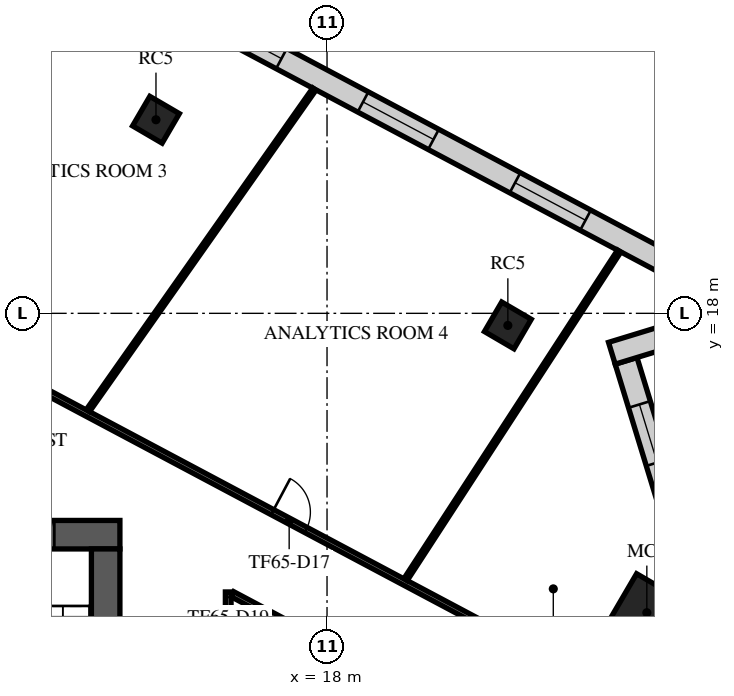
"""IFC4 building model, lengths in metres.
Left out: names, types, materials, properties, quantities, classifications, styles, units other than length and angle.
Written with IfcOpenShell. Run it as: python <this file> out.ifc"""

import sys

from ifc_helpers import new_model, si_unit, direction, frame, frame_2d, origin, origin_2d, place, context, subcontext, project, spatial, rectangle, extrude, element, fill, save


model = new_model("IFC4")
c1 = context("Model", 3, precision=1e-05, world=origin(), true_north=direction((0.0, 1.0)))
c2 = subcontext(c1, "Body", "Model", "MODEL_VIEW")
j1 = project(units=[si_unit("LENGTHUNIT", "METRE"), si_unit("PLANEANGLEUNIT", "RADIAN")], contexts=[c1])
p1 = place(None, origin())
s1 = spatial("IfcSite", under=j1, at=p1, CompositionType="ELEMENT")
p2 = place(p1, origin())
s2 = spatial("IfcBuilding", under=s1, at=p2, CompositionType="ELEMENT")
p3 = place(p2, frame((0.0, 0.0, 274.9)))
s3 = spatial("IfcBuildingStorey", under=s2, at=p3, CompositionType="ELEMENT", Elevation=274.9)
p4 = place(p3, frame((26.415, 10.122, 0.0), z_axis=(0.0, 0.0, 1.0), x_axis=(0.504643651291, 0.863327739165, 0.0)))
e1 = element("IfcColumn", 1, at=p4, inside=s3, PredefinedType="COLUMN", context=c2, shape_type="SweptSolid", body=[
    extrude(rectangle(XDim=1.5, YDim=1.5, at=origin_2d()), origin(), (0.0, 0.0, 1.0), 4.0),
])
for number, where, z_axis, x_axis in (
    (2, (22.758, 17.682, 0.0), (0.0, 0.0, 1.0), (0.505, 0.863, 0.0)),
    (3, (13.499, 23.094, 0.0), (0.0, 0.0, 1.0), (0.505, 0.863, 0.0)),
):
    element("IfcColumn", number, at=place(p3, frame(where, z_axis=z_axis, x_axis=x_axis)), inside=s3, PredefinedType="COLUMN", context=c2, shape_type="SweptSolid", body=[
        extrude(rectangle(XDim=0.9, YDim=0.9, at=origin_2d()), origin(), (0.0, 0.0, 1.0), 4.0),
    ])
p5 = place(p3, frame((-12.55, 12.175, 0.0), z_axis=(0.0, 0.0, 1.0), x_axis=(1.0, 0.0, 0.0)))
e4 = element("IfcWall", 4, at=p5, inside=s3, PredefinedType="SHEAR", context=c2, shape_type="SweptSolid", body=[
    extrude(rectangle(XDim=25.1, YDim=0.75, at=frame_2d((12.55, 0.0))), origin(), (0.0, 0.0, 1.0), 3.64),
])
p6 = place(p5, frame((11.35, 0.0, 0.0)))
e5 = element("IfcOpeningElement", 5, at=p6, cuts=e4, PredefinedType="OPENING", context=c2, shape_type="SweptSolid", body=[
    extrude(rectangle(XDim=2.4, YDim=2.4, at=frame_2d((1.2, 1.2))), frame((0.0, 0.385, 0.0), z_axis=(0.0, -1.0, 0.0), x_axis=(1.0, 0.0, 0.0)), (0.0, 0.0, 1.0), 0.77),
])
p7 = place(p5, frame((22.175, 0.0, 0.0)))
e6 = element("IfcOpeningElement", 6, at=p7, cuts=e4, PredefinedType="OPENING", context=c2, shape_type="SweptSolid", body=[
    extrude(rectangle(XDim=1.2, YDim=2.1, at=frame_2d((0.6, 1.05))), frame((0.0, 0.385, 0.0), z_axis=(0.0, -1.0, 0.0), x_axis=(1.0, 0.0, 0.0)), (0.0, 0.0, 1.0), 0.77),
])
p8 = place(p5, frame((1.15, 0.0, 0.0)))
e7 = element("IfcOpeningElement", 7, at=p8, cuts=e4, PredefinedType="OPENING", context=c2, shape_type="SweptSolid", body=[
    extrude(rectangle(XDim=1.0, YDim=2.1, at=frame_2d((0.5, 1.05))), frame((0.0, 0.385, 0.0), z_axis=(0.0, -1.0, 0.0), x_axis=(1.0, 0.0, 0.0)), (0.0, 0.0, 1.0), 0.77),
])
p9 = place(p3, frame((12.175, -11.8, 0.0), z_axis=(0.0, 0.0, 1.0), x_axis=(0.0, 1.0, 0.0)))
e8 = element("IfcWall", 8, at=p9, inside=s3, PredefinedType="SHEAR", context=c2, shape_type="SweptSolid", body=[
    extrude(rectangle(XDim=23.6, YDim=0.75, at=frame_2d((11.8, 0.0))), origin(), (0.0, 0.0, 1.0), 3.64),
])
p10 = place(p9, frame((10.6, 0.0, 0.0)))
e9 = element("IfcOpeningElement", 9, at=p10, cuts=e8, PredefinedType="OPENING", context=c2, shape_type="SweptSolid", body=[
    extrude(rectangle(XDim=2.4, YDim=2.4, at=frame_2d((1.2, 1.2))), frame((0.0, 0.385, 0.0), z_axis=(0.0, -1.0, 0.0), x_axis=(1.0, 0.0, 0.0)), (0.0, 0.0, 1.0), 0.77),
])
p11 = place(p3, frame((9.233, -32.479, 0.0), z_axis=(0.0, 0.0, 1.0), x_axis=(0.469468429065, 0.882949259081, 0.0)))
e10 = element("IfcWall", 10, at=p11, inside=s3, PredefinedType="STANDARD", context=c2, shape_type="SweptSolid", body=[
    extrude(rectangle(XDim=48.686, YDim=0.6, at=frame_2d((24.343, 0.0))), origin(), (0.0, 0.0, 1.0), 3.64),
])
p12 = place(p11, frame((1.213, 0.0, 0.9)))
e11 = element("IfcOpeningElement", 11, at=p12, cuts=e10, PredefinedType="OPENING", context=c2, shape_type="SweptSolid", body=[
    extrude(rectangle(XDim=2.0, YDim=2.1, at=frame_2d((1.0, 1.05))), frame((0.0, 0.31, 0.0), z_axis=(0.0, -1.0, 0.0), x_axis=(1.0, 0.0, 0.0)), (0.0, 0.0, 1.0), 0.62),
])
p13 = place(p11, frame((5.639, 0.0, 0.9)))
e12 = element("IfcOpeningElement", 12, at=p13, cuts=e10, PredefinedType="OPENING", context=c2, shape_type="SweptSolid", body=[
    extrude(rectangle(XDim=2.0, YDim=2.1, at=frame_2d((1.0, 1.05))), frame((0.0, 0.31, 0.0), z_axis=(0.0, -1.0, 0.0), x_axis=(1.0, 0.0, 0.0)), (0.0, 0.0, 1.0), 0.62),
])
p14 = place(p11, frame((10.065, 0.0, 0.9)))
e13 = element("IfcOpeningElement", 13, at=p14, cuts=e10, PredefinedType="OPENING", context=c2, shape_type="SweptSolid", body=[
    extrude(rectangle(XDim=2.0, YDim=2.1, at=frame_2d((1.0, 1.05))), frame((0.0, 0.31, 0.0), z_axis=(0.0, -1.0, 0.0), x_axis=(1.0, 0.0, 0.0)), (0.0, 0.0, 1.0), 0.62),
])
p15 = place(p11, frame((14.491, 0.0, 0.9)))
e14 = element("IfcOpeningElement", 14, at=p15, cuts=e10, PredefinedType="OPENING", context=c2, shape_type="SweptSolid", body=[
    extrude(rectangle(XDim=2.0, YDim=2.1, at=frame_2d((1.0, 1.05))), frame((0.0, 0.31, 0.0), z_axis=(0.0, -1.0, 0.0), x_axis=(1.0, 0.0, 0.0)), (0.0, 0.0, 1.0), 0.62),
])
p16 = place(p11, frame((18.917, 0.0, 0.9)))
e15 = element("IfcOpeningElement", 15, at=p16, cuts=e10, PredefinedType="OPENING", context=c2, shape_type="SweptSolid", body=[
    extrude(rectangle(XDim=2.0, YDim=2.1, at=frame_2d((1.0, 1.05))), frame((0.0, 0.31, 0.0), z_axis=(0.0, -1.0, 0.0), x_axis=(1.0, 0.0, 0.0)), (0.0, 0.0, 1.0), 0.62),
])
p17 = place(p11, frame((23.343, 0.0, 0.9)))
e16 = element("IfcOpeningElement", 16, at=p17, cuts=e10, PredefinedType="OPENING", context=c2, shape_type="SweptSolid", body=[
    extrude(rectangle(XDim=2.0, YDim=2.1, at=frame_2d((1.0, 1.05))), frame((0.0, 0.31, 0.0), z_axis=(0.0, -1.0, 0.0), x_axis=(1.0, 0.0, 0.0)), (0.0, 0.0, 1.0), 0.62),
])
p18 = place(p11, frame((27.769, 0.0, 0.9)))
e17 = element("IfcOpeningElement", 17, at=p18, cuts=e10, PredefinedType="OPENING", context=c2, shape_type="SweptSolid", body=[
    extrude(rectangle(XDim=2.0, YDim=2.1, at=frame_2d((1.0, 1.05))), frame((0.0, 0.31, 0.0), z_axis=(0.0, -1.0, 0.0), x_axis=(1.0, 0.0, 0.0)), (0.0, 0.0, 1.0), 0.62),
])
p19 = place(p11, frame((32.195, 0.0, 0.9)))
e18 = element("IfcOpeningElement", 18, at=p19, cuts=e10, PredefinedType="OPENING", context=c2, shape_type="SweptSolid", body=[
    extrude(rectangle(XDim=2.0, YDim=2.1, at=frame_2d((1.0, 1.05))), frame((0.0, 0.31, 0.0), z_axis=(0.0, -1.0, 0.0), x_axis=(1.0, 0.0, 0.0)), (0.0, 0.0, 1.0), 0.62),
])
p20 = place(p11, frame((36.621, 0.0, 0.9)))
e19 = element("IfcOpeningElement", 19, at=p20, cuts=e10, PredefinedType="OPENING", context=c2, shape_type="SweptSolid", body=[
    extrude(rectangle(XDim=2.0, YDim=2.1, at=frame_2d((1.0, 1.05))), frame((0.0, 0.31, 0.0), z_axis=(0.0, -1.0, 0.0), x_axis=(1.0, 0.0, 0.0)), (0.0, 0.0, 1.0), 0.62),
])
p21 = place(p11, frame((41.047, 0.0, 0.9)))
e20 = element("IfcOpeningElement", 20, at=p21, cuts=e10, PredefinedType="OPENING", context=c2, shape_type="SweptSolid", body=[
    extrude(rectangle(XDim=2.0, YDim=2.1, at=frame_2d((1.0, 1.05))), frame((0.0, 0.31, 0.0), z_axis=(0.0, -1.0, 0.0), x_axis=(1.0, 0.0, 0.0)), (0.0, 0.0, 1.0), 0.62),
])
p22 = place(p11, frame((45.473, 0.0, 0.9)))
e21 = element("IfcOpeningElement", 21, at=p22, cuts=e10, PredefinedType="OPENING", context=c2, shape_type="SweptSolid", body=[
    extrude(rectangle(XDim=2.0, YDim=2.1, at=frame_2d((1.0, 1.05))), frame((0.0, 0.31, 0.0), z_axis=(0.0, -1.0, 0.0), x_axis=(1.0, 0.0, 0.0)), (0.0, 0.0, 1.0), 0.62),
])
p23 = place(p3, frame((28.208, 9.1, 0.0), z_axis=(0.0, 0.0, 1.0), x_axis=(-0.292389102139, 0.956299436866, 0.0)))
e22 = element("IfcWall", 22, at=p23, inside=s3, PredefinedType="STANDARD", context=c2, shape_type="SweptSolid", body=[
    extrude(rectangle(XDim=8.0, YDim=0.6, at=frame_2d((4.0, 0.0))), origin(), (0.0, 0.0, 1.0), 3.64),
])
p24 = place(p23, frame((5.2, 0.0, 0.9)))
e23 = element("IfcOpeningElement", 23, at=p24, cuts=e22, PredefinedType="OPENING", context=c2, shape_type="SweptSolid", body=[
    extrude(rectangle(XDim=1.6, YDim=2.1, at=frame_2d((0.8, 1.05))), frame((0.0, 0.31, 0.0), z_axis=(0.0, -1.0, 0.0), x_axis=(1.0, 0.0, 0.0)), (0.0, 0.0, 1.0), 0.62),
])
p25 = place(p3, frame((25.495, 16.949, 0.0), z_axis=(0.0, 0.0, 1.0), x_axis=(0.956292267386, 0.292412549899, 0.0)))
e24 = element("IfcWall", 24, at=p25, inside=s3, PredefinedType="STANDARD", context=c2, shape_type="SweptSolid", body=[
    extrude(rectangle(XDim=4.635, YDim=0.6, at=frame_2d((2.318, 0.0))), origin(), (0.0, 0.0, 1.0), 3.64),
])
p26 = place(p25, frame((1.818, 0.0, 0.9)))
e25 = element("IfcOpeningElement", 25, at=p26, cuts=e24, PredefinedType="OPENING", context=c2, shape_type="SweptSolid", body=[
    extrude(rectangle(XDim=1.6, YDim=2.1, at=frame_2d((0.8, 1.05))), frame((0.0, 0.31, 0.0), z_axis=(0.0, -1.0, 0.0), x_axis=(1.0, 0.0, 0.0)), (0.0, 0.0, 1.0), 0.62),
])
p27 = place(p3, frame((29.875, 17.753, 0.0), z_axis=(0.0, 0.0, 1.0), x_axis=(-0.88294707281, 0.469472540854, 0.0)))
e26 = element("IfcWall", 26, at=p27, inside=s3, PredefinedType="STANDARD", context=c2, shape_type="SweptSolid", body=[
    extrude(rectangle(XDim=36.243, YDim=0.6, at=frame_2d((18.122, 0.0))), origin(), (0.0, 0.0, 1.0), 3.64),
])
p28 = place(p27, frame((1.215, 0.0, 0.9)))
e27 = element("IfcOpeningElement", 27, at=p28, cuts=e26, PredefinedType="OPENING", context=c2, shape_type="SweptSolid", body=[
    extrude(rectangle(XDim=2.1, YDim=2.1, at=frame_2d((1.05, 1.05))), frame((0.0, 0.31, 0.0), z_axis=(0.0, -1.0, 0.0), x_axis=(1.0, 0.0, 0.0)), (0.0, 0.0, 1.0), 0.62),
])
p29 = place(p27, frame((5.746, 0.0, 0.9)))
e28 = element("IfcOpeningElement", 28, at=p29, cuts=e26, PredefinedType="OPENING", context=c2, shape_type="SweptSolid", body=[
    extrude(rectangle(XDim=2.1, YDim=2.1, at=frame_2d((1.05, 1.05))), frame((0.0, 0.31, 0.0), z_axis=(0.0, -1.0, 0.0), x_axis=(1.0, 0.0, 0.0)), (0.0, 0.0, 1.0), 0.62),
])
p30 = place(p27, frame((10.276, 0.0, 0.9)))
e29 = element("IfcOpeningElement", 29, at=p30, cuts=e26, PredefinedType="OPENING", context=c2, shape_type="SweptSolid", body=[
    extrude(rectangle(XDim=2.1, YDim=2.1, at=frame_2d((1.05, 1.05))), frame((0.0, 0.31, 0.0), z_axis=(0.0, -1.0, 0.0), x_axis=(1.0, 0.0, 0.0)), (0.0, 0.0, 1.0), 0.62),
])
p31 = place(p27, frame((14.806, 0.0, 0.9)))
e30 = element("IfcOpeningElement", 30, at=p31, cuts=e26, PredefinedType="OPENING", context=c2, shape_type="SweptSolid", body=[
    extrude(rectangle(XDim=2.1, YDim=2.1, at=frame_2d((1.05, 1.05))), frame((0.0, 0.31, 0.0), z_axis=(0.0, -1.0, 0.0), x_axis=(1.0, 0.0, 0.0)), (0.0, 0.0, 1.0), 0.62),
])
p32 = place(p27, frame((19.337, 0.0, 0.9)))
e31 = element("IfcOpeningElement", 31, at=p32, cuts=e26, PredefinedType="OPENING", context=c2, shape_type="SweptSolid", body=[
    extrude(rectangle(XDim=2.1, YDim=2.1, at=frame_2d((1.05, 1.05))), frame((0.0, 0.31, 0.0), z_axis=(0.0, -1.0, 0.0), x_axis=(1.0, 0.0, 0.0)), (0.0, 0.0, 1.0), 0.62),
])
p33 = place(p27, frame((23.867, 0.0, 0.9)))
e32 = element("IfcOpeningElement", 32, at=p33, cuts=e26, PredefinedType="OPENING", context=c2, shape_type="SweptSolid", body=[
    extrude(rectangle(XDim=2.1, YDim=2.1, at=frame_2d((1.05, 1.05))), frame((0.0, 0.31, 0.0), z_axis=(0.0, -1.0, 0.0), x_axis=(1.0, 0.0, 0.0)), (0.0, 0.0, 1.0), 0.62),
])
p34 = place(p27, frame((28.398, 0.0, 0.9)))
e33 = element("IfcOpeningElement", 33, at=p34, cuts=e26, PredefinedType="OPENING", context=c2, shape_type="SweptSolid", body=[
    extrude(rectangle(XDim=2.1, YDim=2.1, at=frame_2d((1.05, 1.05))), frame((0.0, 0.31, 0.0), z_axis=(0.0, -1.0, 0.0), x_axis=(1.0, 0.0, 0.0)), (0.0, 0.0, 1.0), 0.62),
])
p35 = place(p27, frame((32.928, 0.0, 0.9)))
e34 = element("IfcOpeningElement", 34, at=p35, cuts=e26, PredefinedType="OPENING", context=c2, shape_type="SweptSolid", body=[
    extrude(rectangle(XDim=2.1, YDim=2.1, at=frame_2d((1.05, 1.05))), frame((0.0, 0.31, 0.0), z_axis=(0.0, -1.0, 0.0), x_axis=(1.0, 0.0, 0.0)), (0.0, 0.0, 1.0), 0.62),
])
p36 = place(p3, frame((-8.385, 26.033, 0.0), z_axis=(0.0, 0.0, 1.0), x_axis=(0.882949433839, -0.46946810039, 0.0)))
e35 = element("IfcWall", 35, at=p36, inside=s3, PredefinedType="PARTITIONING", context=c2, shape_type="SweptSolid", body=[
    extrude(rectangle(XDim=39.325, YDim=0.15, at=frame_2d((19.662, 0.0))), origin(), (0.0, 0.0, 1.0), 3.04),
])
p37 = place(p36, frame((10.622, 0.0, 0.0)))
e36 = element("IfcOpeningElement", 36, at=p37, cuts=e35, PredefinedType="OPENING", context=c2, shape_type="SweptSolid", body=[
    extrude(rectangle(XDim=1.0, YDim=2.1, at=frame_2d((0.5, 1.05))), frame((0.0, 0.085, 0.0), z_axis=(0.0, -1.0, 0.0), x_axis=(1.0, 0.0, 0.0)), (0.0, 0.0, 1.0), 0.17),
])
p38 = place(p36, frame((16.615, 0.0, 0.0)))
e37 = element("IfcOpeningElement", 37, at=p38, cuts=e35, PredefinedType="OPENING", context=c2, shape_type="SweptSolid", body=[
    extrude(rectangle(XDim=1.0, YDim=2.1, at=frame_2d((0.5, 1.05))), frame((0.0, 0.085, 0.0), z_axis=(0.0, -1.0, 0.0), x_axis=(1.0, 0.0, 0.0)), (0.0, 0.0, 1.0), 0.17),
])
p39 = place(p36, frame((28.254, 0.0, 0.0)))
e38 = element("IfcOpeningElement", 38, at=p39, cuts=e35, PredefinedType="OPENING", context=c2, shape_type="SweptSolid", body=[
    extrude(rectangle(XDim=1.0, YDim=2.1, at=frame_2d((0.5, 1.05))), frame((0.0, 0.085, 0.0), z_axis=(0.0, -1.0, 0.0), x_axis=(1.0, 0.0, 0.0)), (0.0, 0.0, 1.0), 0.17),
])
p40 = place(p3, frame((15.4, -15.325, 0.0), z_axis=(0.0, 0.0, 1.0), x_axis=(0.0, 1.0, 0.0)))
e39 = element("IfcWall", 39, at=p40, inside=s3, PredefinedType="PARTITIONING", context=c2, shape_type="SweptSolid", body=[
    extrude(rectangle(XDim=25.993, YDim=0.15, at=frame_2d((12.997, 0.0))), origin(), (0.0, 0.0, 1.0), 3.24),
])
p41 = place(p40, frame((0.8, 0.0, 0.0)))
e40 = element("IfcOpeningElement", 40, at=p41, cuts=e39, PredefinedType="OPENING", context=c2, shape_type="SweptSolid", body=[
    extrude(rectangle(XDim=1.8, YDim=2.1, at=frame_2d((0.9, 1.05))), frame((0.0, 0.085, 0.0), z_axis=(0.0, -1.0, 0.0), x_axis=(1.0, 0.0, 0.0)), (0.0, 0.0, 1.0), 0.17),
])
p42 = place(p40, frame((11.567, 0.0, 0.0)))
e41 = element("IfcOpeningElement", 41, at=p42, cuts=e39, PredefinedType="OPENING", context=c2, shape_type="SweptSolid", body=[
    extrude(rectangle(XDim=1.0, YDim=2.1, at=frame_2d((0.5, 1.05))), frame((0.0, 0.085, 0.0), z_axis=(0.0, -1.0, 0.0), x_axis=(1.0, 0.0, 0.0)), (0.0, 0.0, 1.0), 0.17),
])
p43 = place(p40, frame((23.696, 0.0, 0.0)))
e42 = element("IfcOpeningElement", 42, at=p43, cuts=e39, PredefinedType="OPENING", context=c2, shape_type="SweptSolid", body=[
    extrude(rectangle(XDim=1.0, YDim=2.1, at=frame_2d((0.5, 1.05))), frame((0.0, 0.085, 0.0), z_axis=(0.0, -1.0, 0.0), x_axis=(1.0, 0.0, 0.0)), (0.0, 0.0, 1.0), 0.17),
])
p44 = place(p3, frame((15.51, 10.609, 0.0), z_axis=(0.0, 0.0, 1.0), x_axis=(0.882945895242, -0.469474755525, 0.0)))
e43 = element("IfcWall", 43, at=p44, inside=s3, PredefinedType="PARTITIONING", context=c2, shape_type="SweptSolid", body=[
    extrude(rectangle(XDim=10.986, YDim=0.15, at=frame_2d((5.493, 0.0))), origin(), (0.0, 0.0, 1.0), 3.24),
])
p45 = place(p3, frame((11.709, 15.441, 0.0), z_axis=(0.0, 0.0, 1.0), x_axis=(0.575721307139, 0.817645997058, 0.0)))
e44 = element("IfcWall", 44, at=p45, inside=s3, PredefinedType="PARTITIONING", context=c2, shape_type="SweptSolid", body=[
    extrude(rectangle(XDim=10.348, YDim=0.1, at=frame_2d((5.174, 0.0))), origin(), (0.0, 0.0, 1.0), 3.04),
])
p46 = place(p3, frame((20.067, 10.995, 0.0), z_axis=(0.0, 0.0, 1.0), x_axis=(0.545104885897, 0.838367856834, 0.0)))
e45 = element("IfcWall", 45, at=p46, inside=s3, PredefinedType="PARTITIONING", context=c2, shape_type="SweptSolid", body=[
    extrude(rectangle(XDim=10.309, YDim=0.1, at=frame_2d((5.154, 0.0))), origin(), (0.0, 0.0, 1.0), 3.04),
])
p47 = place(p7, origin())
e46 = element("IfcDoor", 46, at=p47, inside=s3, OperationType="SINGLE_SWING_LEFT", PredefinedType="DOOR", context=c2, shape_type="SweptSolid", body=[
    extrude(rectangle(XDim=1.2, YDim=2.1, at=frame_2d((0.6, 1.05))), frame((0.0, 0.025, 0.0), z_axis=(0.0, -1.0, 0.0), x_axis=(1.0, 0.0, 0.0)), (0.0, 0.0, 1.0), 0.05),
])
fill(e6, e46)
p48 = place(p24, origin())
e47 = element("IfcWindow", 47, at=p48, inside=s3, PartitioningType="SINGLE_PANEL", PredefinedType="WINDOW", context=c2, shape_type="SweptSolid", body=[
    extrude(rectangle(XDim=1.6, YDim=2.1, at=frame_2d((0.8, 1.05))), frame((0.0, 0.03, 0.0), z_axis=(0.0, -1.0, 0.0), x_axis=(1.0, 0.0, 0.0)), (0.0, 0.0, 1.0), 0.06),
])
fill(e23, e47)
p49 = place(p29, origin())
e48 = element("IfcWindow", 48, at=p49, inside=s3, PartitioningType="SINGLE_PANEL", PredefinedType="WINDOW", context=c2, shape_type="SweptSolid", body=[
    extrude(rectangle(XDim=2.1, YDim=2.1, at=frame_2d((1.05, 1.05))), frame((0.0, 0.03, 0.0), z_axis=(0.0, -1.0, 0.0), x_axis=(1.0, 0.0, 0.0)), (0.0, 0.0, 1.0), 0.06),
])
fill(e28, e48)
p50 = place(p30, origin())
e49 = element("IfcWindow", 49, at=p50, inside=s3, PartitioningType="SINGLE_PANEL", PredefinedType="WINDOW", context=c2, shape_type="SweptSolid", body=[
    extrude(rectangle(XDim=2.1, YDim=2.1, at=frame_2d((1.05, 1.05))), frame((0.0, 0.03, 0.0), z_axis=(0.0, -1.0, 0.0), x_axis=(1.0, 0.0, 0.0)), (0.0, 0.0, 1.0), 0.06),
])
fill(e29, e49)
p51 = place(p31, origin())
e50 = element("IfcWindow", 50, at=p51, inside=s3, PartitioningType="SINGLE_PANEL", PredefinedType="WINDOW", context=c2, shape_type="SweptSolid", body=[
    extrude(rectangle(XDim=2.1, YDim=2.1, at=frame_2d((1.05, 1.05))), frame((0.0, 0.03, 0.0), z_axis=(0.0, -1.0, 0.0), x_axis=(1.0, 0.0, 0.0)), (0.0, 0.0, 1.0), 0.06),
])
fill(e30, e50)
p52 = place(p39, origin())
e51 = element("IfcDoor", 51, at=p52, inside=s3, OperationType="SINGLE_SWING_RIGHT", PredefinedType="DOOR", context=c2, shape_type="SweptSolid", body=[
    extrude(rectangle(XDim=1.0, YDim=2.1, at=frame_2d((0.5, 1.05))), frame((0.0, 0.025, 0.0), z_axis=(0.0, -1.0, 0.0), x_axis=(1.0, 0.0, 0.0)), (0.0, 0.0, 1.0), 0.05),
])
fill(e38, e51)
save(model, sys.argv[1])
